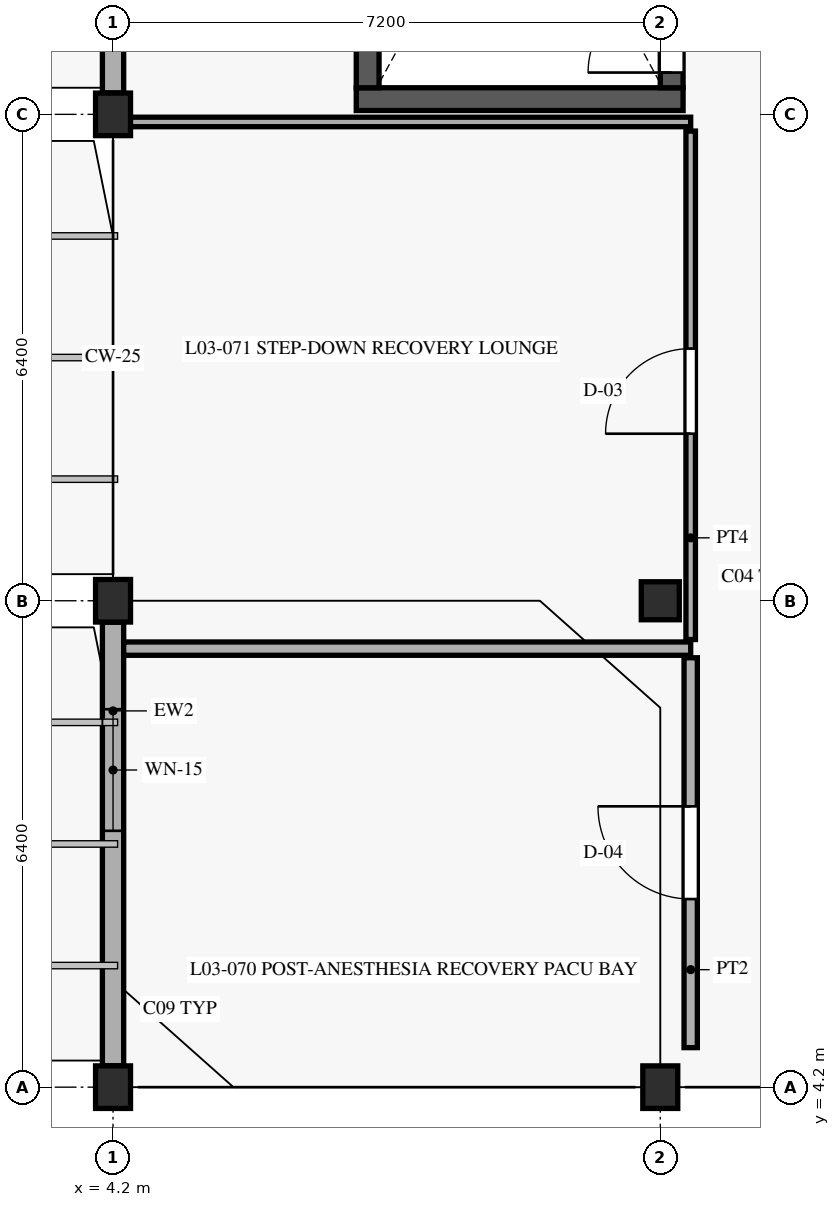
"""IFC4 building model, lengths in metres.
Left out: names, types, materials, properties, quantities, classifications, styles, units other than length and angle.
Written with IfcOpenShell. Run it as: python <this file> out.ifc"""

import sys

from ifc_helpers import new_model, si_unit, direction, frame, frame_2d, origin, origin_with_axes, origin_2d, place, context, subcontext, project, spatial, rectangle, extrude, element, fill, save


model = new_model("IFC4")
c1 = context("Model", 3, precision=1e-05, world=origin(), true_north=direction((0.0, 1.0)))
c2 = subcontext(c1, "Body", "Model", "MODEL_VIEW")
j1 = project(units=[si_unit("LENGTHUNIT", "METRE"), si_unit("PLANEANGLEUNIT", "RADIAN")], contexts=[c1])
p1 = place(None, origin())
s1 = spatial("IfcSite", under=j1, at=p1, CompositionType="ELEMENT")
p2 = place(p1, origin())
s2 = spatial("IfcBuilding", under=s1, at=p2, CompositionType="ELEMENT")
p3 = place(p2, frame((0.0, 0.0, 9.3)))
s3 = spatial("IfcBuildingStorey", under=s2, at=p3, CompositionType="ELEMENT", Elevation=9.3)
for number, where, z_axis, x_axis in (
    (1, (4.2, 4.2, 0.0), (0.0, 0.0, 1.0), (1.0, 0.0, 0.0)),
    (2, (4.2, 10.6, 0.0), (0.0, 0.0, 1.0), (1.0, 0.0, 0.0)),
    (3, (4.2, 17.0, 0.0), (0.0, 0.0, 1.0), (1.0, 0.0, 0.0)),
    (4, (11.4, 4.2, 0.0), (0.0, 0.0, 1.0), (1.0, 0.0, 0.0)),
):
    element("IfcColumn", number, at=place(p3, frame(where, z_axis=z_axis, x_axis=x_axis)), inside=s3, PredefinedType="COLUMN", context=c2, shape_type="SweptSolid", body=[
        extrude(rectangle(XDim=0.46, YDim=0.56, at=origin_2d()), origin(), (0.0, 0.0, 1.0), 4.2),
    ])
p4 = place(p3, frame((11.4, 10.6, 0.0), z_axis=(0.0, 0.0, 1.0), x_axis=(1.0, 0.0, 0.0)))
e5 = element("IfcColumn", 5, at=p4, inside=s3, PredefinedType="COLUMN", context=c2, shape_type="SweptSolid", body=[
    extrude(rectangle(XDim=0.5, YDim=0.5, at=origin_2d()), origin(), (0.0, 0.0, 1.0), 4.2),
])
p5 = place(p3, frame((7.4, 17.2, 0.0), z_axis=(0.0, 0.0, 1.0), x_axis=(1.0, 0.0, 0.0)))
e6 = element("IfcWall", 6, at=p5, inside=s3, PredefinedType="SHEAR", context=c2, shape_type="SweptSolid", body=[
    extrude(rectangle(XDim=4.3, YDim=0.3, at=frame_2d((2.15, 0.0))), origin(), (0.0, 0.0, 1.0), 3.9),
])
p6 = place(p3, frame((7.55, 29.05, 0.0), z_axis=(0.0, 0.0, 1.0), x_axis=(0.0, -1.0, 0.0)))
e7 = element("IfcWall", 7, at=p6, inside=s3, PredefinedType="SHEAR", context=c2, shape_type="SweptSolid", body=[
    extrude(rectangle(XDim=11.7, YDim=0.3, at=frame_2d((5.85, 0.0))), origin(), (0.0, 0.0, 1.0), 3.9),
])
p7 = place(p3, frame((11.55, 17.35, 0.0), z_axis=(0.0, 0.0, 1.0), x_axis=(0.0, 1.0, 0.0)))
e8 = element("IfcWall", 8, at=p7, inside=s3, PredefinedType="SHEAR", context=c2, shape_type="SweptSolid", body=[
    extrude(rectangle(XDim=11.7, YDim=0.3, at=frame_2d((5.85, 0.0))), origin(), (0.0, 0.0, 1.0), 3.9),
])
p8 = place(p7, frame((0.2, 0.0, 0.0)))
e9 = element("IfcOpeningElement", 9, at=p8, cuts=e8, PredefinedType="OPENING", context=c2, shape_type="SweptSolid", body=[
    extrude(rectangle(XDim=1.1, YDim=2.2, at=frame_2d((0.55, 1.1))), frame((0.0, 0.16, 0.0), z_axis=(0.0, -1.0, 0.0), x_axis=(1.0, 0.0, 0.0)), (0.0, 0.0, 1.0), 0.32),
])
p9 = place(p7, frame((7.875, 0.0, 0.0)))
e10 = element("IfcOpeningElement", 10, at=p9, cuts=e8, PredefinedType="OPENING", context=c2, shape_type="SweptSolid", body=[
    extrude(rectangle(XDim=1.15, YDim=2.2, at=frame_2d((0.575, 1.1))), frame((0.0, 0.16, 0.0), z_axis=(0.0, -1.0, 0.0), x_axis=(1.0, 0.0, 0.0)), (0.0, 0.0, 1.0), 0.32),
])
p10 = place(p7, frame((10.14, 0.0, 0.0)))
e11 = element("IfcOpeningElement", 11, at=p10, cuts=e8, PredefinedType="OPENING", context=c2, shape_type="SweptSolid", body=[
    extrude(rectangle(XDim=1.02, YDim=2.15, at=frame_2d((0.51, 1.075))), frame((0.0, 0.16, 0.0), z_axis=(0.0, -1.0, 0.0), x_axis=(1.0, 0.0, 0.0)), (0.0, 0.0, 1.0), 0.32),
])
p11 = place(p3, frame((4.2, 10.318, 0.0), z_axis=(0.0, 0.0, 1.0), x_axis=(0.0, -1.0, 0.0)))
e12 = element("IfcWall", 12, at=p11, inside=s3, PredefinedType="SOLIDWALL", context=c2, shape_type="SweptSolid", body=[
    extrude(rectangle(XDim=5.836, YDim=0.28, at=frame_2d((2.918, 0.0))), origin(), (0.0, 0.0, 1.0), 3.48),
])
p12 = place(p11, frame((1.145, 0.0, 0.88)))
e13 = element("IfcOpeningElement", 13, at=p12, cuts=e12, PredefinedType="OPENING", context=c2, shape_type="SweptSolid", body=[
    extrude(rectangle(XDim=1.6, YDim=2.05, at=frame_2d((0.8, 1.025))), frame((0.0, 0.15, 0.0), z_axis=(0.0, -1.0, 0.0), x_axis=(1.0, 0.0, 0.0)), (0.0, 0.0, 1.0), 0.3),
])
p13 = place(p3, frame((4.2, 23.118, 0.0), z_axis=(0.0, 0.0, 1.0), x_axis=(0.0, -1.0, 0.0)))
e14 = element("IfcWall", 14, at=p13, inside=s3, PredefinedType="SOLIDWALL", context=c2, shape_type="SweptSolid", body=[
    extrude(rectangle(XDim=5.836, YDim=0.28, at=frame_2d((2.918, 0.0))), origin(), (0.0, 0.0, 1.0), 3.48),
])
p14 = place(p13, frame((1.045, 0.0, 0.88)))
e15 = element("IfcOpeningElement", 15, at=p14, cuts=e14, PredefinedType="OPENING", context=c2, shape_type="SweptSolid", body=[
    extrude(rectangle(XDim=1.8, YDim=2.05, at=frame_2d((0.9, 1.025))), frame((0.0, 0.15, 0.0), z_axis=(0.0, -1.0, 0.0), x_axis=(1.0, 0.0, 0.0)), (0.0, 0.0, 1.0), 0.3),
])
p15 = place(p13, frame((3.241, 0.0, 0.88)))
e16 = element("IfcOpeningElement", 16, at=p15, cuts=e14, PredefinedType="OPENING", context=c2, shape_type="SweptSolid", body=[
    extrude(rectangle(XDim=1.3, YDim=1.7, at=frame_2d((0.65, 0.85))), frame((0.0, 0.15, 0.0), z_axis=(0.0, -1.0, 0.0), x_axis=(1.0, 0.0, 0.0)), (0.0, 0.0, 1.0), 0.3),
])
p16 = place(p3, frame((11.8, 4.72, 0.0), z_axis=(0.0, 0.0, 1.0), x_axis=(0.0, 1.0, 0.0)))
e17 = element("IfcWall", 17, at=p16, inside=s3, PredefinedType="PARTITIONING", context=c2, shape_type="SweptSolid", body=[
    extrude(rectangle(XDim=5.13, YDim=0.175, at=frame_2d((2.565, 0.0))), origin(), (0.0, 0.0, 1.0), 3.895),
])
p17 = place(p16, frame((1.955, 0.0, 0.0)))
e18 = element("IfcOpeningElement", 18, at=p17, cuts=e17, PredefinedType="OPENING", context=c2, shape_type="SweptSolid", body=[
    extrude(rectangle(XDim=1.22, YDim=2.2, at=frame_2d((0.61, 1.1))), frame((0.0, 0.098, 0.0), z_axis=(0.0, -1.0, 0.0), x_axis=(1.0, 0.0, 0.0)), (0.0, 0.0, 1.0), 0.195),
])
p18 = place(p3, frame((4.34, 9.97, 0.0), z_axis=(0.0, 0.0, 1.0), x_axis=(1.0, 0.0, 0.0)))
e19 = element("IfcWall", 19, at=p18, inside=s3, PredefinedType="PARTITIONING", context=c2, shape_type="SweptSolid", body=[
    extrude(rectangle(XDim=7.46, YDim=0.175, at=frame_2d((3.73, 0.0))), origin(), (0.0, 0.0, 1.0), 3.475),
])
p19 = place(p3, frame((11.8, 10.09, 0.0), z_axis=(0.0, 0.0, 1.0), x_axis=(0.0, 1.0, 0.0)))
e20 = element("IfcWall", 20, at=p19, inside=s3, PredefinedType="PARTITIONING", context=c2, shape_type="SweptSolid", body=[
    extrude(rectangle(XDim=6.69, YDim=0.125, at=frame_2d((3.345, 0.0))), origin(), (0.0, 0.0, 1.0), 3.495),
])
p20 = place(p19, frame((2.708, 0.0, 0.0)))
e21 = element("IfcOpeningElement", 21, at=p20, cuts=e20, PredefinedType="OPENING", context=c2, shape_type="SweptSolid", body=[
    extrude(rectangle(XDim=1.12, YDim=2.2, at=frame_2d((0.56, 1.1))), frame((0.0, 0.073, 0.0), z_axis=(0.0, -1.0, 0.0), x_axis=(1.0, 0.0, 0.0)), (0.0, 0.0, 1.0), 0.145),
])
p21 = place(p3, frame((4.34, 16.9, 0.0), z_axis=(0.0, 0.0, 1.0), x_axis=(1.0, 0.0, 0.0)))
e22 = element("IfcWall", 22, at=p21, inside=s3, PredefinedType="PARTITIONING", context=c2, shape_type="SweptSolid", body=[
    extrude(rectangle(XDim=7.46, YDim=0.125, at=frame_2d((3.73, 0.0))), origin(), (0.0, 0.0, 1.0), 3.495),
])
p22 = place(p8, origin_with_axes())
e23 = element("IfcDoor", 23, at=p22, inside=s3, OperationType="SINGLE_SWING_LEFT", PredefinedType="DOOR", context=c2, shape_type="SweptSolid", body=[
    extrude(rectangle(XDim=1.1, YDim=2.2, at=frame_2d((0.55, 1.1))), frame((0.0, 0.025, 0.0), z_axis=(0.0, -1.0, 0.0), x_axis=(1.0, 0.0, 0.0)), (0.0, 0.0, 1.0), 0.05),
])
fill(e9, e23)
p23 = place(p12, origin_with_axes())
e24 = element("IfcWindow", 24, at=p23, inside=s3, PartitioningType="SINGLE_PANEL", PredefinedType="WINDOW", context=c2, shape_type="SweptSolid", body=[
    extrude(rectangle(XDim=1.6, YDim=2.05, at=frame_2d((0.8, 1.025))), frame((0.0, 0.03, 0.0), z_axis=(0.0, -1.0, 0.0), x_axis=(1.0, 0.0, 0.0)), (0.0, 0.0, 1.0), 0.06),
])
fill(e13, e24)
p24 = place(p17, origin_with_axes())
e25 = element("IfcDoor", 25, at=p24, inside=s3, OperationType="SINGLE_SWING_RIGHT", PredefinedType="DOOR", context=c2, shape_type="SweptSolid", body=[
    extrude(rectangle(XDim=1.22, YDim=2.2, at=frame_2d((0.61, 1.1))), frame((0.0, 0.025, 0.0), z_axis=(0.0, -1.0, 0.0), x_axis=(1.0, 0.0, 0.0)), (0.0, 0.0, 1.0), 0.05),
])
fill(e18, e25)
p25 = place(p20, origin_with_axes())
e26 = element("IfcDoor", 26, at=p25, inside=s3, OperationType="SINGLE_SWING_LEFT", PredefinedType="DOOR", context=c2, shape_type="SweptSolid", body=[
    extrude(rectangle(XDim=1.12, YDim=2.2, at=frame_2d((0.56, 1.1))), frame((0.0, 0.025, 0.0), z_axis=(0.0, -1.0, 0.0), x_axis=(1.0, 0.0, 0.0)), (0.0, 0.0, 1.0), 0.05),
])
fill(e21, e26)
save(model, sys.argv[1])
